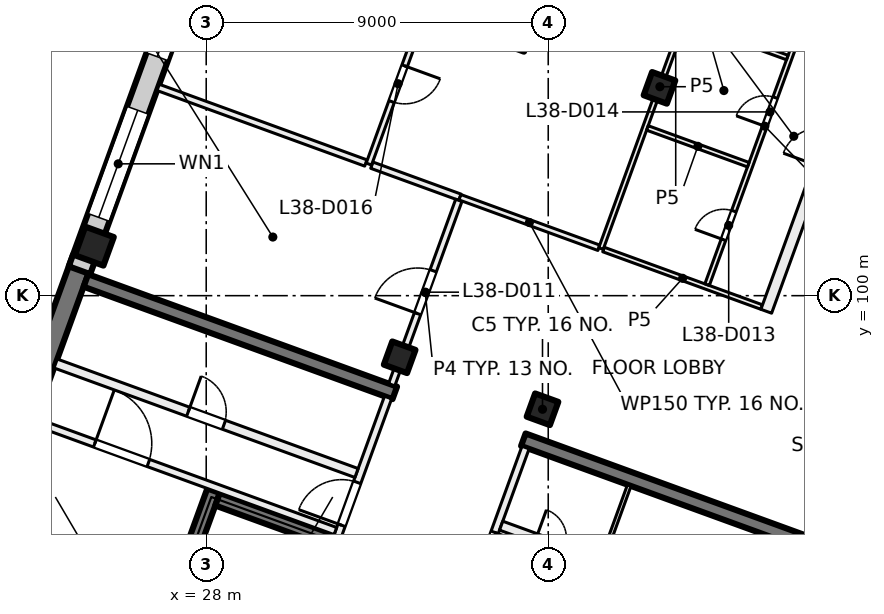
"""IFC4 building model, lengths in metres.
Left out: names, types, materials, properties, quantities, classifications, styles, units other than length and angle.
Written with IfcOpenShell. Run it as: python <this file> out.ifc"""

import sys

from ifc_helpers import new_model, si_unit, direction, frame, frame_2d, origin, origin_2d, place, context, subcontext, project, spatial, rectangle, extrude, element, fill, save


model = new_model("IFC4")
c1 = context("Model", 3, precision=1e-05, world=origin(), true_north=direction((0.0, 1.0)))
c2 = subcontext(c1, "Body", "Model", "MODEL_VIEW")
j1 = project(units=[si_unit("LENGTHUNIT", "METRE"), si_unit("PLANEANGLEUNIT", "RADIAN")], contexts=[c1])
p1 = place(None, origin())
s1 = spatial("IfcSite", under=j1, at=p1, CompositionType="ELEMENT")
p2 = place(p1, origin())
s2 = spatial("IfcBuilding", under=s1, at=p2, CompositionType="ELEMENT")
p3 = place(p2, frame((0.0, 0.0, 162.5)))
s3 = spatial("IfcBuildingStorey", under=s2, at=p3, CompositionType="ELEMENT", Elevation=162.5)
for number, where, z_axis, x_axis in (
    (1, (39.927, 105.468, 0.0), (0.0, 0.0, 1.0), (-0.342, -0.94, 0.0)),
    (2, (36.849, 97.011, 0.0), (0.0, 0.0, 1.0), (-0.342, -0.94, 0.0)),
    (3, (33.091, 98.379, 0.0), (0.0, 0.0, 1.0), (-0.342, -0.94, 0.0)),
):
    element("IfcColumn", number, at=place(p3, frame(where, z_axis=z_axis, x_axis=x_axis)), inside=s3, PredefinedType="COLUMN", context=c2, shape_type="SweptSolid", body=[
        extrude(rectangle(XDim=0.65, YDim=0.65, at=origin_2d()), origin(), (0.0, 0.0, 1.0), 4.0),
    ])
p4 = place(p3, frame((25.056, 101.303, 0.0), z_axis=(0.0, 0.0, 1.0), x_axis=(-0.342020143326, -0.939692620786, 0.0)))
e4 = element("IfcColumn", 4, at=p4, inside=s3, PredefinedType="COLUMN", context=c2, shape_type="SweptSolid", body=[
    extrude(rectangle(XDim=0.8, YDim=0.8, at=origin_2d()), origin(), (0.0, 0.0, 1.0), 4.0),
])
p5 = place(p3, frame((41.85, 85.241, 0.0), z_axis=(0.0, 0.0, 1.0), x_axis=(0.34201902012, 0.939693029598, 0.0)))
e5 = element("IfcWall", 5, at=p5, inside=s3, PredefinedType="SHEAR", context=c2, shape_type="SweptSolid", body=[
    extrude(rectangle(XDim=8.95, YDim=0.55, at=frame_2d((4.475, 0.0))), origin(), (0.0, 0.0, 1.0), 4.0),
])
p6 = place(p3, frame((21.694, 92.577, 0.0), z_axis=(0.0, 0.0, 1.0), x_axis=(0.342010253184, 0.939696220444, 0.0)))
e6 = element("IfcWall", 6, at=p6, inside=s3, PredefinedType="SHEAR", context=c2, shape_type="SweptSolid", body=[
    extrude(rectangle(XDim=8.95, YDim=0.55, at=frame_2d((4.475, 0.0))), origin(), (0.0, 0.0, 1.0), 4.0),
])
p7 = place(p3, frame((27.208, 82.216, 0.0), z_axis=(0.0, 0.0, 1.0), x_axis=(0.34201563943, 0.939694260058, 0.0)))
e7 = element("IfcWall", 7, at=p7, inside=s3, PredefinedType="SHEAR", context=c2, shape_type="SweptSolid", body=[
    extrude(rectangle(XDim=12.225, YDim=0.35, at=frame_2d((6.113, 0.0))), origin(), (0.0, 0.0, 1.0), 4.0),
])
p8 = place(p7, frame((0.7, 0.0, 0.0)))
e8 = element("IfcOpeningElement", 8, at=p8, cuts=e7, PredefinedType="OPENING", context=c2, shape_type="SweptSolid", body=[
    extrude(rectangle(XDim=1.1, YDim=2.1, at=frame_2d((0.55, 1.05))), frame((0.0, 0.185, 0.0), z_axis=(0.0, -1.0, 0.0), x_axis=(1.0, 0.0, 0.0)), (0.0, 0.0, 1.0), 0.37),
])
p9 = place(p7, frame((3.1, 0.0, 0.0)))
e9 = element("IfcOpeningElement", 9, at=p9, cuts=e7, PredefinedType="OPENING", context=c2, shape_type="SweptSolid", body=[
    extrude(rectangle(XDim=1.1, YDim=2.1, at=frame_2d((0.55, 1.05))), frame((0.0, 0.185, 0.0), z_axis=(0.0, -1.0, 0.0), x_axis=(1.0, 0.0, 0.0)), (0.0, 0.0, 1.0), 0.37),
])
p10 = place(p7, frame((5.5, 0.0, 0.0)))
e10 = element("IfcOpeningElement", 10, at=p10, cuts=e7, PredefinedType="OPENING", context=c2, shape_type="SweptSolid", body=[
    extrude(rectangle(XDim=1.1, YDim=2.1, at=frame_2d((0.55, 1.05))), frame((0.0, 0.185, 0.0), z_axis=(0.0, -1.0, 0.0), x_axis=(1.0, 0.0, 0.0)), (0.0, 0.0, 1.0), 0.37),
])
p11 = place(p7, frame((10.3, 0.0, 0.0)))
e11 = element("IfcOpeningElement", 11, at=p11, cuts=e7, PredefinedType="OPENING", context=c2, shape_type="SweptSolid", body=[
    extrude(rectangle(XDim=1.1, YDim=2.1, at=frame_2d((0.55, 1.05))), frame((0.0, 0.185, 0.0), z_axis=(0.0, -1.0, 0.0), x_axis=(1.0, 0.0, 0.0)), (0.0, 0.0, 1.0), 0.37),
])
p12 = place(p3, frame((24.013, 83.379, 0.0), z_axis=(0.0, 0.0, 1.0), x_axis=(0.34201563943, 0.939694260058, 0.0)))
e12 = element("IfcWall", 12, at=p12, inside=s3, PredefinedType="SHEAR", context=c2, shape_type="SweptSolid", body=[
    extrude(rectangle(XDim=12.225, YDim=0.35, at=frame_2d((6.113, 0.0))), origin(), (0.0, 0.0, 1.0), 4.0),
])
p13 = place(p12, frame((7.95, 0.0, 0.0)))
e13 = element("IfcOpeningElement", 13, at=p13, cuts=e12, PredefinedType="OPENING", context=c2, shape_type="SweptSolid", body=[
    extrude(rectangle(XDim=1.1, YDim=2.1, at=frame_2d((0.55, 1.05))), frame((0.0, 0.185, 0.0), z_axis=(0.0, -1.0, 0.0), x_axis=(1.0, 0.0, 0.0)), (0.0, 0.0, 1.0), 0.37),
])
p14 = place(p3, frame((31.165, 93.599, 0.0), z_axis=(0.0, 0.0, 1.0), x_axis=(-0.939683528043, 0.3420451244, 0.0)))
e14 = element("IfcWall", 14, at=p14, inside=s3, PredefinedType="SHEAR", context=c2, shape_type="SweptSolid", body=[
    extrude(rectangle(XDim=3.05, YDim=0.35, at=frame_2d((1.525, 0.0))), origin(), (0.0, 0.0, 1.0), 4.0),
])
p15 = place(p3, frame((44.473, 93.251, 0.0), z_axis=(0.0, 0.0, 1.0), x_axis=(-0.939692847377, 0.34201952077, 0.0)))
e15 = element("IfcWall", 15, at=p15, inside=s3, PredefinedType="SHEAR", context=c2, shape_type="SweptSolid", body=[
    extrude(rectangle(XDim=8.65, YDim=0.35, at=frame_2d((4.325, 0.0))), origin(), (0.0, 0.0, 1.0), 4.0),
])
p16 = place(p3, frame((32.962, 97.441, 0.0), z_axis=(0.0, 0.0, 1.0), x_axis=(-0.939689545667, 0.342028592028, 0.0)))
e16 = element("IfcWall", 16, at=p16, inside=s3, PredefinedType="SHEAR", context=c2, shape_type="SweptSolid", body=[
    extrude(rectangle(XDim=8.65, YDim=0.35, at=frame_2d((4.325, 0.0))), origin(), (0.0, 0.0, 1.0), 4.0),
])
p17 = place(p3, frame((24.666, 100.669, 0.0), z_axis=(0.0, 0.0, 1.0), x_axis=(0.34201964167, 0.939692803373, 0.0)))
e17 = element("IfcWall", 17, at=p17, inside=s3, PredefinedType="SOLIDWALL", context=c2, shape_type="SweptSolid", body=[
    extrude(rectangle(XDim=32.884, YDim=0.6, at=frame_2d((16.442, 0.0))), origin(), (0.0, 0.0, 1.0), 3.625),
])
p18 = place(p17, frame((1.48, 0.0, 0.9)))
e18 = element("IfcOpeningElement", 18, at=p18, cuts=e17, PredefinedType="OPENING", context=c2, shape_type="SweptSolid", body=[
    extrude(rectangle(XDim=3.0, YDim=2.4, at=frame_2d((1.5, 1.2))), frame((0.0, 0.31, 0.0), z_axis=(0.0, -1.0, 0.0), x_axis=(1.0, 0.0, 0.0)), (0.0, 0.0, 1.0), 0.62),
])
p19 = place(p17, frame((5.98, 0.0, 0.9)))
e19 = element("IfcOpeningElement", 19, at=p19, cuts=e17, PredefinedType="OPENING", context=c2, shape_type="SweptSolid", body=[
    extrude(rectangle(XDim=3.0, YDim=2.4, at=frame_2d((1.5, 1.2))), frame((0.0, 0.31, 0.0), z_axis=(0.0, -1.0, 0.0), x_axis=(1.0, 0.0, 0.0)), (0.0, 0.0, 1.0), 0.62),
])
p20 = place(p17, frame((10.48, 0.0, 0.9)))
e20 = element("IfcOpeningElement", 20, at=p20, cuts=e17, PredefinedType="OPENING", context=c2, shape_type="SweptSolid", body=[
    extrude(rectangle(XDim=3.0, YDim=2.4, at=frame_2d((1.5, 1.2))), frame((0.0, 0.31, 0.0), z_axis=(0.0, -1.0, 0.0), x_axis=(1.0, 0.0, 0.0)), (0.0, 0.0, 1.0), 0.62),
])
p21 = place(p17, frame((14.98, 0.0, 0.9)))
e21 = element("IfcOpeningElement", 21, at=p21, cuts=e17, PredefinedType="OPENING", context=c2, shape_type="SweptSolid", body=[
    extrude(rectangle(XDim=3.0, YDim=2.4, at=frame_2d((1.5, 1.2))), frame((0.0, 0.31, 0.0), z_axis=(0.0, -1.0, 0.0), x_axis=(1.0, 0.0, 0.0)), (0.0, 0.0, 1.0), 0.62),
])
p22 = place(p17, frame((19.48, 0.0, 0.9)))
e22 = element("IfcOpeningElement", 22, at=p22, cuts=e17, PredefinedType="OPENING", context=c2, shape_type="SweptSolid", body=[
    extrude(rectangle(XDim=3.0, YDim=2.4, at=frame_2d((1.5, 1.2))), frame((0.0, 0.31, 0.0), z_axis=(0.0, -1.0, 0.0), x_axis=(1.0, 0.0, 0.0)), (0.0, 0.0, 1.0), 0.62),
])
p23 = place(p17, frame((23.98, 0.0, 0.9)))
e23 = element("IfcOpeningElement", 23, at=p23, cuts=e17, PredefinedType="OPENING", context=c2, shape_type="SweptSolid", body=[
    extrude(rectangle(XDim=3.0, YDim=2.4, at=frame_2d((1.5, 1.2))), frame((0.0, 0.31, 0.0), z_axis=(0.0, -1.0, 0.0), x_axis=(1.0, 0.0, 0.0)), (0.0, 0.0, 1.0), 0.62),
])
p24 = place(p17, frame((28.48, 0.0, 0.9)))
e24 = element("IfcOpeningElement", 24, at=p24, cuts=e17, PredefinedType="OPENING", context=c2, shape_type="SweptSolid", body=[
    extrude(rectangle(XDim=3.0, YDim=2.4, at=frame_2d((1.5, 1.2))), frame((0.0, 0.31, 0.0), z_axis=(0.0, -1.0, 0.0), x_axis=(1.0, 0.0, 0.0)), (0.0, 0.0, 1.0), 0.62),
])
p25 = place(p3, frame((31.459, 93.678, 0.0), z_axis=(0.0, 0.0, 1.0), x_axis=(0.341985870128, 0.939705094502, 0.0)))
e25 = element("IfcWall", 25, at=p25, inside=s3, PredefinedType="PARTITIONING", context=c2, shape_type="SweptSolid", body=[
    extrude(rectangle(XDim=3.875, YDim=0.2, at=frame_2d((1.938, 0.0))), origin(), (0.0, 0.0, 1.0), 3.625),
])
p26 = place(p25, frame((0.3, 0.0, 0.0)))
e26 = element("IfcOpeningElement", 26, at=p26, cuts=e25, PredefinedType="OPENING", context=c2, shape_type="SweptSolid", body=[
    extrude(rectangle(XDim=1.2, YDim=2.1, at=frame_2d((0.6, 1.05))), frame((0.0, 0.11, 0.0), z_axis=(0.0, -1.0, 0.0), x_axis=(1.0, 0.0, 0.0)), (0.0, 0.0, 1.0), 0.22),
])
p27 = place(p3, frame((23.483, 96.688, 0.0), z_axis=(0.0, 0.0, 1.0), x_axis=(0.939691007314, -0.342024576271, 0.0)))
e27 = element("IfcWall", 27, at=p27, inside=s3, PredefinedType="PARTITIONING", context=c2, shape_type="SweptSolid", body=[
    extrude(rectangle(XDim=8.425, YDim=0.2, at=frame_2d((4.212, 0.0))), origin(), (0.0, 0.0, 1.0), 3.625),
])
p28 = place(p27, frame((1.688, 0.0, 0.0)))
e28 = element("IfcOpeningElement", 28, at=p28, cuts=e27, PredefinedType="OPENING", context=c2, shape_type="SweptSolid", body=[
    extrude(rectangle(XDim=1.5, YDim=2.1, at=frame_2d((0.75, 1.05))), frame((0.0, 0.11, 0.0), z_axis=(0.0, -1.0, 0.0), x_axis=(1.0, 0.0, 0.0)), (0.0, 0.0, 1.0), 0.22),
])
p29 = place(p3, frame((24.039, 98.215, 0.0), z_axis=(0.0, 0.0, 1.0), x_axis=(0.939687617333, -0.342033889887, 0.0)))
e29 = element("IfcWall", 29, at=p29, inside=s3, PredefinedType="PARTITIONING", context=c2, shape_type="SweptSolid", body=[
    extrude(rectangle(XDim=8.425, YDim=0.25, at=frame_2d((4.212, 0.0))), origin(), (0.0, 0.0, 1.0), 3.625),
])
p30 = place(p29, frame((3.712, 0.0, 0.0)))
e30 = element("IfcOpeningElement", 30, at=p30, cuts=e29, PredefinedType="OPENING", context=c2, shape_type="SweptSolid", body=[
    extrude(rectangle(XDim=1.0, YDim=2.1, at=frame_2d((0.5, 1.05))), frame((0.0, 0.135, 0.0), z_axis=(0.0, -1.0, 0.0), x_axis=(1.0, 0.0, 0.0)), (0.0, 0.0, 1.0), 0.27),
])
p31 = place(p3, frame((36.403, 96.003, 0.0), z_axis=(0.0, 0.0, 1.0), x_axis=(-0.342041503764, -0.939684845947, 0.0)))
e31 = element("IfcWall", 31, at=p31, inside=s3, PredefinedType="PARTITIONING", context=c2, shape_type="SweptSolid", body=[
    extrude(rectangle(XDim=3.875, YDim=0.2, at=frame_2d((1.938, 0.0))), origin(), (0.0, 0.0, 1.0), 3.625),
])
p32 = place(p31, frame((2.375, 0.0, 0.0)))
e32 = element("IfcOpeningElement", 32, at=p32, cuts=e31, PredefinedType="OPENING", context=c2, shape_type="SweptSolid", body=[
    extrude(rectangle(XDim=1.2, YDim=2.1, at=frame_2d((0.6, 1.05))), frame((0.0, 0.11, 0.0), z_axis=(0.0, -1.0, 0.0), x_axis=(1.0, 0.0, 0.0)), (0.0, 0.0, 1.0), 0.22),
])
p33 = place(p3, frame((35.761, 93.948, 0.0), z_axis=(0.0, 0.0, 1.0), x_axis=(0.93969693093, -0.342008301071, 0.0)))
e33 = element("IfcWall", 33, at=p33, inside=s3, PredefinedType="PARTITIONING", context=c2, shape_type="SweptSolid", body=[
    extrude(rectangle(XDim=8.425, YDim=0.25, at=frame_2d((4.212, 0.0))), origin(), (0.0, 0.0, 1.0), 3.625),
])
p34 = place(p33, frame((0.978, 0.0, 0.0)))
e34 = element("IfcOpeningElement", 34, at=p34, cuts=e33, PredefinedType="OPENING", context=c2, shape_type="SweptSolid", body=[
    extrude(rectangle(XDim=0.8, YDim=2.1, at=frame_2d((0.4, 1.05))), frame((0.0, 0.135, 0.0), z_axis=(0.0, -1.0, 0.0), x_axis=(1.0, 0.0, 0.0)), (0.0, 0.0, 1.0), 0.27),
])
p35 = place(p33, frame((5.24, 0.0, 0.0)))
e35 = element("IfcOpeningElement", 35, at=p35, cuts=e33, PredefinedType="OPENING", context=c2, shape_type="SweptSolid", body=[
    extrude(rectangle(XDim=0.8, YDim=2.1, at=frame_2d((0.4, 1.05))), frame((0.0, 0.135, 0.0), z_axis=(0.0, -1.0, 0.0), x_axis=(1.0, 0.0, 0.0)), (0.0, 0.0, 1.0), 0.27),
])
p36 = place(p3, frame((39.132, 95.009, 0.0), z_axis=(0.0, 0.0, 1.0), x_axis=(-0.342043138314, -0.939684250976, 0.0)))
e36 = element("IfcWall", 36, at=p36, inside=s3, PredefinedType="PARTITIONING", context=c2, shape_type="SweptSolid", body=[
    extrude(rectangle(XDim=2.025, YDim=0.1, at=frame_2d((1.012, 0.0))), origin(), (0.0, 0.0, 1.0), 3.625),
])
p37 = place(p3, frame((26.736, 105.48, 0.0), z_axis=(0.0, 0.0, 1.0), x_axis=(0.939674453825, -0.342070052516, 0.0)))
e37 = element("IfcWall", 37, at=p37, inside=s3, PredefinedType="PARTITIONING", context=c2, shape_type="SweptSolid", body=[
    extrude(rectangle(XDim=5.815, YDim=0.175, at=frame_2d((2.907, 0.0))), origin(), (0.0, 0.0, 1.0), 3.625),
])
p38 = place(p3, frame((32.359, 103.433, 0.0), z_axis=(0.0, 0.0, 1.0), x_axis=(0.939784753685, -0.341766904105, 0.0)))
e38 = element("IfcWall", 38, at=p38, inside=s3, PredefinedType="PARTITIONING", context=c2, shape_type="SweptSolid", body=[
    extrude(rectangle(XDim=2.467, YDim=0.175, at=frame_2d((1.233, 0.0))), origin(), (0.0, 0.0, 1.0), 3.625),
])
p39 = place(p3, frame((32.881, 97.657, 0.0), z_axis=(0.0, 0.0, 1.0), x_axis=(0.342058204353, 0.939678766832, 0.0)))
e39 = element("IfcWall", 39, at=p39, inside=s3, PredefinedType="PARTITIONING", context=c2, shape_type="SweptSolid", body=[
    extrude(rectangle(XDim=5.163, YDim=0.175, at=frame_2d((2.581, 0.0))), origin(), (0.0, 0.0, 1.0), 3.625),
])
p40 = place(p39, frame((1.991, 0.0, 0.0)))
e40 = element("IfcOpeningElement", 40, at=p40, cuts=e39, PredefinedType="OPENING", context=c2, shape_type="SweptSolid", body=[
    extrude(rectangle(XDim=1.2, YDim=2.1, at=frame_2d((0.6, 1.05))), frame((0.0, 0.097, 0.0), z_axis=(0.0, -1.0, 0.0), x_axis=(1.0, 0.0, 0.0)), (0.0, 0.0, 1.0), 0.195),
])
p41 = place(p3, frame((34.677, 102.59, 0.0), z_axis=(0.0, 0.0, 1.0), x_axis=(0.939712759945, -0.341964806371, 0.0)))
e41 = element("IfcWall", 41, at=p41, inside=s3, PredefinedType="PARTITIONING", context=c2, shape_type="SweptSolid", body=[
    extrude(rectangle(XDim=3.889, YDim=0.15, at=frame_2d((1.945, 0.0))), origin(), (0.0, 0.0, 1.0), 3.625),
])
p42 = place(p3, frame((35.385, 111.99, 0.0), z_axis=(0.0, 0.0, 1.0), x_axis=(-0.342153449842, -0.939644090473, 0.0)))
e42 = element("IfcWall", 42, at=p42, inside=s3, PredefinedType="PARTITIONING", context=c2, shape_type="SweptSolid", body=[
    extrude(rectangle(XDim=9.075, YDim=0.15, at=frame_2d((4.537, 0.0))), origin(), (0.0, 0.0, 1.0), 3.625),
])
p43 = place(p42, frame((6.325, 0.0, 0.0)))
e43 = element("IfcOpeningElement", 43, at=p43, cuts=e42, PredefinedType="OPENING", context=c2, shape_type="SweptSolid", body=[
    extrude(rectangle(XDim=1.0, YDim=2.1, at=frame_2d((0.5, 1.05))), frame((0.0, 0.085, 0.0), z_axis=(0.0, -1.0, 0.0), x_axis=(1.0, 0.0, 0.0)), (0.0, 0.0, 1.0), 0.17),
])
p44 = place(p3, frame((38.455, 101.214, 0.0), z_axis=(0.0, 0.0, 1.0), x_axis=(0.939738687483, -0.341893549585, 0.0)))
e44 = element("IfcWall", 44, at=p44, inside=s3, PredefinedType="PARTITIONING", context=c2, shape_type="SweptSolid", body=[
    extrude(rectangle(XDim=4.429, YDim=0.125, at=frame_2d((2.214, 0.0))), origin(), (0.0, 0.0, 1.0), 3.625),
])
p45 = place(p3, frame((38.388, 101.24, 0.0), z_axis=(0.0, 0.0, 1.0), x_axis=(0.342067486799, 0.93967538782, 0.0)))
e45 = element("IfcWall", 45, at=p45, inside=s3, PredefinedType="PARTITIONING", context=c2, shape_type="SweptSolid", body=[
    extrude(rectangle(XDim=9.063, YDim=0.125, at=frame_2d((4.531, 0.0))), origin(), (0.0, 0.0, 1.0), 3.625),
])
p46 = place(p3, frame((41.181, 100.29, 0.0), z_axis=(0.0, 0.0, 1.0), x_axis=(0.34222012082, 0.939619810831, 0.0)))
e46 = element("IfcWall", 46, at=p46, inside=s3, PredefinedType="PARTITIONING", context=c2, shape_type="SweptSolid", body=[
    extrude(rectangle(XDim=8.875, YDim=0.125, at=frame_2d((4.438, 0.0))), origin(), (0.0, 0.0, 1.0), 3.625),
])
p47 = place(p46, frame((1.258, 0.0, 0.0)))
e47 = element("IfcOpeningElement", 47, at=p47, cuts=e46, PredefinedType="OPENING", context=c2, shape_type="SweptSolid", body=[
    extrude(rectangle(XDim=0.8, YDim=2.1, at=frame_2d((0.4, 1.05))), frame((0.0, 0.073, 0.0), z_axis=(0.0, -1.0, 0.0), x_axis=(1.0, 0.0, 0.0)), (0.0, 0.0, 1.0), 0.145),
])
p48 = place(p46, frame((4.437, 0.0, 0.0)))
e48 = element("IfcOpeningElement", 48, at=p48, cuts=e46, PredefinedType="OPENING", context=c2, shape_type="SweptSolid", body=[
    extrude(rectangle(XDim=0.8, YDim=2.1, at=frame_2d((0.4, 1.05))), frame((0.0, 0.073, 0.0), z_axis=(0.0, -1.0, 0.0), x_axis=(1.0, 0.0, 0.0)), (0.0, 0.0, 1.0), 0.145),
])
p49 = place(p46, frame((7.116, 0.0, 0.0)))
e49 = element("IfcOpeningElement", 49, at=p49, cuts=e46, PredefinedType="OPENING", context=c2, shape_type="SweptSolid", body=[
    extrude(rectangle(XDim=1.0, YDim=2.1, at=frame_2d((0.5, 1.05))), frame((0.0, 0.073, 0.0), z_axis=(0.0, -1.0, 0.0), x_axis=(1.0, 0.0, 0.0)), (0.0, 0.0, 1.0), 0.145),
])
p50 = place(p3, frame((42.264, 103.446, 0.0), z_axis=(0.0, 0.0, 1.0), x_axis=(-0.939563555473, 0.342374539396, 0.0)))
e50 = element("IfcWall", 50, at=p50, inside=s3, PredefinedType="PARTITIONING", context=c2, shape_type="SweptSolid", body=[
    extrude(rectangle(XDim=2.824, YDim=0.125, at=frame_2d((1.412, 0.0))), origin(), (0.0, 0.0, 1.0), 3.625),
])
p51 = place(p3, frame((42.737, 99.59, 0.0), z_axis=(0.0, 0.0, 1.0), x_axis=(0.341992703977, 0.939702607438, 0.0)))
e51 = element("IfcWall", 51, at=p51, inside=s3, PredefinedType="PARTITIONING", context=c2, shape_type="SweptSolid", body=[
    extrude(rectangle(XDim=23.006, YDim=0.3, at=frame_2d((11.503, 0.0))), origin(), (0.0, 0.0, 1.0), 3.625),
])
p52 = place(p51, frame((4.062, 0.0, 0.0)))
e52 = element("IfcOpeningElement", 52, at=p52, cuts=e51, PredefinedType="OPENING", context=c2, shape_type="SweptSolid", body=[
    extrude(rectangle(XDim=1.0, YDim=2.1, at=frame_2d((0.5, 1.05))), frame((0.0, 0.16, 0.0), z_axis=(0.0, -1.0, 0.0), x_axis=(1.0, 0.0, 0.0)), (0.0, 0.0, 1.0), 0.32),
])
p53 = place(p51, frame((14.912, 0.0, 0.0)))
e53 = element("IfcOpeningElement", 53, at=p53, cuts=e51, PredefinedType="OPENING", context=c2, shape_type="SweptSolid", body=[
    extrude(rectangle(XDim=1.8, YDim=2.1, at=frame_2d((0.9, 1.05))), frame((0.0, 0.16, 0.0), z_axis=(0.0, -1.0, 0.0), x_axis=(1.0, 0.0, 0.0)), (0.0, 0.0, 1.0), 0.32),
])
p54 = place(p3, frame((43.29, 106.266, 0.0), z_axis=(0.0, 0.0, 1.0), x_axis=(-0.939601484935, 0.342270433294, 0.0)))
e54 = element("IfcWall", 54, at=p54, inside=s3, PredefinedType="PARTITIONING", context=c2, shape_type="SweptSolid", body=[
    extrude(rectangle(XDim=2.825, YDim=0.125, at=frame_2d((1.412, 0.0))), origin(), (0.0, 0.0, 1.0), 3.625),
])
p55 = place(p18, origin())
e55 = element("IfcWindow", 55, at=p55, inside=s3, PartitioningType="SINGLE_PANEL", PredefinedType="WINDOW", context=c2, shape_type="SweptSolid", body=[
    extrude(rectangle(XDim=3.0, YDim=2.4, at=frame_2d((1.5, 1.2))), frame((0.0, 0.03, 0.0), z_axis=(0.0, -1.0, 0.0), x_axis=(1.0, 0.0, 0.0)), (0.0, 0.0, 1.0), 0.06),
])
fill(e18, e55)
p56 = place(p19, origin())
e56 = element("IfcWindow", 56, at=p56, inside=s3, PartitioningType="SINGLE_PANEL", PredefinedType="WINDOW", context=c2, shape_type="SweptSolid", body=[
    extrude(rectangle(XDim=3.0, YDim=2.4, at=frame_2d((1.5, 1.2))), frame((0.0, 0.03, 0.0), z_axis=(0.0, -1.0, 0.0), x_axis=(1.0, 0.0, 0.0)), (0.0, 0.0, 1.0), 0.06),
])
fill(e19, e56)
p57 = place(p26, origin())
e57 = element("IfcDoor", 57, at=p57, inside=s3, OperationType="DOUBLE_DOOR_SINGLE_SWING", PredefinedType="DOOR", context=c2, shape_type="SweptSolid", body=[
    extrude(rectangle(XDim=1.2, YDim=2.1, at=frame_2d((0.6, 1.05))), frame((0.0, 0.025, 0.0), z_axis=(0.0, -1.0, 0.0), x_axis=(1.0, 0.0, 0.0)), (0.0, 0.0, 1.0), 0.05),
])
fill(e26, e57)
p58 = place(p28, origin())
e58 = element("IfcDoor", 58, at=p58, inside=s3, OperationType="DOUBLE_DOOR_SINGLE_SWING", PredefinedType="DOOR", context=c2, shape_type="SweptSolid", body=[
    extrude(rectangle(XDim=1.5, YDim=2.1, at=frame_2d((0.75, 1.05))), frame((0.0, 0.025, 0.0), z_axis=(0.0, -1.0, 0.0), x_axis=(1.0, 0.0, 0.0)), (0.0, 0.0, 1.0), 0.05),
])
fill(e28, e58)
p59 = place(p30, origin())
e59 = element("IfcDoor", 59, at=p59, inside=s3, OperationType="SINGLE_SWING_LEFT", PredefinedType="DOOR", context=c2, shape_type="SweptSolid", body=[
    extrude(rectangle(XDim=1.0, YDim=2.1, at=frame_2d((0.5, 1.05))), frame((0.0, 0.025, 0.0), z_axis=(0.0, -1.0, 0.0), x_axis=(1.0, 0.0, 0.0)), (0.0, 0.0, 1.0), 0.05),
])
fill(e30, e59)
p60 = place(p32, origin())
e60 = element("IfcDoor", 60, at=p60, inside=s3, OperationType="DOUBLE_DOOR_SINGLE_SWING", PredefinedType="DOOR", context=c2, shape_type="SweptSolid", body=[
    extrude(rectangle(XDim=1.2, YDim=2.1, at=frame_2d((0.6, 1.05))), frame((0.0, 0.025, 0.0), z_axis=(0.0, -1.0, 0.0), x_axis=(1.0, 0.0, 0.0)), (0.0, 0.0, 1.0), 0.05),
])
fill(e32, e60)
p61 = place(p40, origin())
e61 = element("IfcDoor", 61, at=p61, inside=s3, OperationType="DOUBLE_DOOR_SINGLE_SWING", PredefinedType="DOOR", context=c2, shape_type="SweptSolid", body=[
    extrude(rectangle(XDim=1.2, YDim=2.1, at=frame_2d((0.6, 1.05))), frame((0.0, 0.025, 0.0), z_axis=(0.0, -1.0, 0.0), x_axis=(1.0, 0.0, 0.0)), (0.0, 0.0, 1.0), 0.05),
])
fill(e40, e61)
p62 = place(p47, origin())
e62 = element("IfcDoor", 62, at=p62, inside=s3, OperationType="SINGLE_SWING_LEFT", PredefinedType="DOOR", context=c2, shape_type="SweptSolid", body=[
    extrude(rectangle(XDim=0.8, YDim=2.1, at=frame_2d((0.4, 1.05))), frame((0.0, 0.025, 0.0), z_axis=(0.0, -1.0, 0.0), x_axis=(1.0, 0.0, 0.0)), (0.0, 0.0, 1.0), 0.05),
])
fill(e47, e62)
p63 = place(p48, origin())
e63 = element("IfcDoor", 63, at=p63, inside=s3, OperationType="SINGLE_SWING_LEFT", PredefinedType="DOOR", context=c2, shape_type="SweptSolid", body=[
    extrude(rectangle(XDim=0.8, YDim=2.1, at=frame_2d((0.4, 1.05))), frame((0.0, 0.025, 0.0), z_axis=(0.0, -1.0, 0.0), x_axis=(1.0, 0.0, 0.0)), (0.0, 0.0, 1.0), 0.05),
])
fill(e48, e63)
p64 = place(p43, origin())
e64 = element("IfcDoor", 64, at=p64, inside=s3, OperationType="SINGLE_SWING_LEFT", PredefinedType="DOOR", context=c2, shape_type="SweptSolid", body=[
    extrude(rectangle(XDim=1.0, YDim=2.1, at=frame_2d((0.5, 1.05))), frame((0.0, 0.025, 0.0), z_axis=(0.0, -1.0, 0.0), x_axis=(1.0, 0.0, 0.0)), (0.0, 0.0, 1.0), 0.05),
])
fill(e43, e64)
save(model, sys.argv[1])
